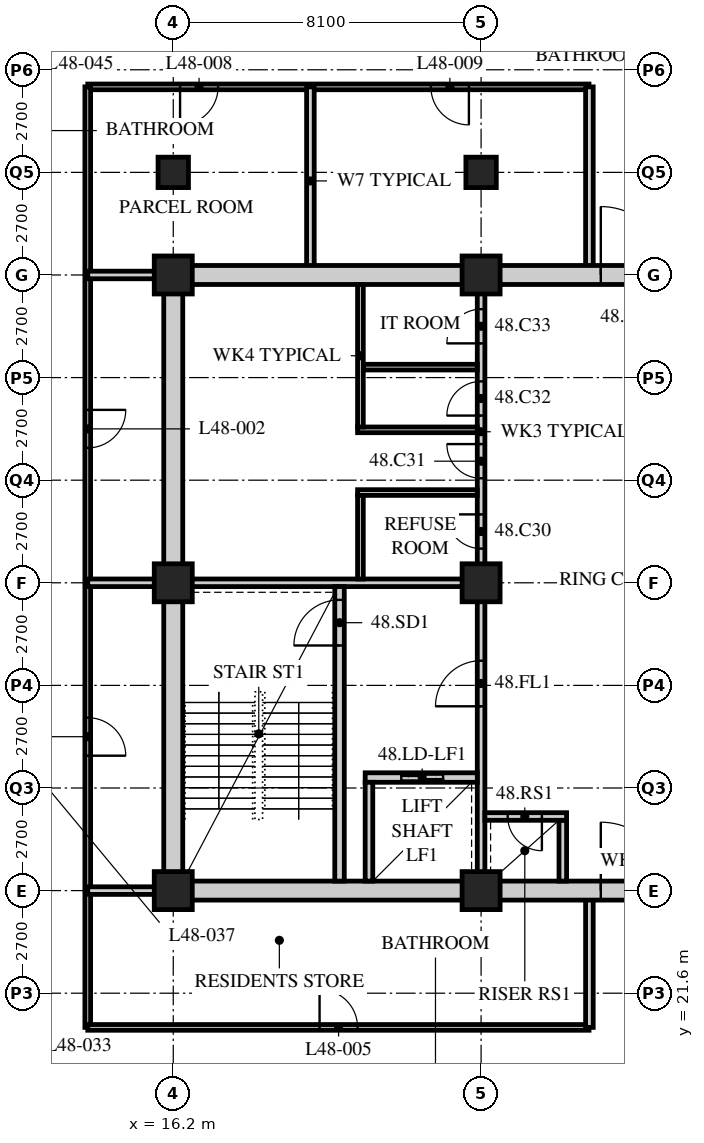
"""IFC4 building model, lengths in metres.
Left out: names, types, materials, properties, quantities, classifications, styles, units other than length and angle.
Written with IfcOpenShell. Run it as: python <this file> out.ifc"""

import sys

from ifc_helpers import new_model, si_unit, direction, frame, frame_2d, origin, origin_2d, place, context, subcontext, project, spatial, rectangle, hollow_rectangle, extrude, element, fill, save


model = new_model("IFC4")
c1 = context("Model", 3, precision=1e-05, world=origin(), true_north=direction((0.0, 1.0)))
c2 = subcontext(c1, "Body", "Model", "MODEL_VIEW")
j1 = project(units=[si_unit("LENGTHUNIT", "METRE"), si_unit("PLANEANGLEUNIT", "RADIAN")], contexts=[c1])
p1 = place(None, origin())
s1 = spatial("IfcSite", under=j1, at=p1, CompositionType="ELEMENT")
p2 = place(p1, origin())
s2 = spatial("IfcBuilding", under=s1, at=p2, CompositionType="ELEMENT")
p3 = place(p2, frame((0.0, 0.0, 188.4)))
s3 = spatial("IfcBuildingStorey", under=s2, at=p3, CompositionType="ELEMENT", Elevation=188.4)
for number, where, z_axis, x_axis in (
    (1, (16.2, 24.3, 0.0), (0.0, 0.0, 1.0), (1.0, 0.0, 0.0)),
    (2, (16.2, 32.4, 0.0), (0.0, 0.0, 1.0), (1.0, 0.0, 0.0)),
    (3, (16.2, 40.5, 0.0), (0.0, 0.0, 1.0), (1.0, 0.0, 0.0)),
):
    element("IfcColumn", number, at=place(p3, frame(where, z_axis=z_axis, x_axis=x_axis)), inside=s3, PredefinedType="COLUMN", context=c2, shape_type="SweptSolid", body=[
        extrude(hollow_rectangle(XDim=1.0, YDim=1.0, WallThickness=0.1, at=origin_2d()), origin(), (0.0, 0.0, 1.0), 3.6),
    ])
p4 = place(p3, frame((16.2, 43.2, 0.0), z_axis=(0.0, 0.0, 1.0), x_axis=(1.0, 0.0, 0.0)))
e4 = element("IfcColumn", 4, at=p4, inside=s3, PredefinedType="COLUMN", context=c2, shape_type="SweptSolid", body=[
    extrude(hollow_rectangle(XDim=0.8, YDim=0.8, WallThickness=0.08, at=origin_2d()), origin(), (0.0, 0.0, 1.0), 3.6),
])
for number, where, z_axis, x_axis in (
    (5, (24.3, 24.3, 0.0), (0.0, 0.0, 1.0), (1.0, 0.0, 0.0)),
    (6, (24.3, 32.4, 0.0), (0.0, 0.0, 1.0), (1.0, 0.0, 0.0)),
    (7, (24.3, 40.5, 0.0), (0.0, 0.0, 1.0), (1.0, 0.0, 0.0)),
):
    element("IfcColumn", number, at=place(p3, frame(where, z_axis=z_axis, x_axis=x_axis)), inside=s3, PredefinedType="COLUMN", context=c2, shape_type="SweptSolid", body=[
        extrude(hollow_rectangle(XDim=1.0, YDim=1.0, WallThickness=0.1, at=origin_2d()), origin(), (0.0, 0.0, 1.0), 3.6),
    ])
p5 = place(p3, frame((24.3, 43.2, 0.0), z_axis=(0.0, 0.0, 1.0), x_axis=(1.0, 0.0, 0.0)))
e8 = element("IfcColumn", 8, at=p5, inside=s3, PredefinedType="COLUMN", context=c2, shape_type="SweptSolid", body=[
    extrude(hollow_rectangle(XDim=0.8, YDim=0.8, WallThickness=0.08, at=origin_2d()), origin(), (0.0, 0.0, 1.0), 3.6),
])
p6 = place(p3, frame((27.14, 45.45, 0.0), z_axis=(0.0, 0.0, 1.0), x_axis=(-1.0, 0.0, 0.0)))
e9 = element("IfcWall", 9, at=p6, inside=s3, PredefinedType="PARTITIONING", context=c2, shape_type="SweptSolid", body=[
    extrude(rectangle(XDim=13.19, YDim=0.15, at=frame_2d((6.595, 0.0))), origin(), (0.0, 0.0, 1.0), 3.39),
])
p7 = place(p6, frame((9.761, 0.0, 0.0)))
e10 = element("IfcOpeningElement", 10, at=p7, cuts=e9, PredefinedType="OPENING", context=c2, shape_type="SweptSolid", body=[
    extrude(rectangle(XDim=1.0, YDim=2.1, at=frame_2d((0.5, 1.05))), frame((0.0, 0.085, 0.0), z_axis=(0.0, -1.0, 0.0), x_axis=(1.0, 0.0, 0.0)), (0.0, 0.0, 1.0), 0.17),
])
p8 = place(p6, frame((3.161, 0.0, 0.0)))
e11 = element("IfcOpeningElement", 11, at=p8, cuts=e9, PredefinedType="OPENING", context=c2, shape_type="SweptSolid", body=[
    extrude(rectangle(XDim=1.0, YDim=2.1, at=frame_2d((0.5, 1.05))), frame((0.0, 0.085, 0.0), z_axis=(0.0, -1.0, 0.0), x_axis=(1.0, 0.0, 0.0)), (0.0, 0.0, 1.0), 0.17),
])
p9 = place(p3, frame((13.95, 45.45, 0.0), z_axis=(0.0, 0.0, 1.0), x_axis=(0.0, -1.0, 0.0)))
e12 = element("IfcWall", 12, at=p9, inside=s3, PredefinedType="PARTITIONING", context=c2, shape_type="SweptSolid", body=[
    extrude(rectangle(XDim=24.75, YDim=0.15, at=frame_2d((12.375, 0.0))), origin(), (0.0, 0.0, 1.0), 3.39),
])
p10 = place(p9, frame((16.6, 0.0, 0.0)))
e13 = element("IfcOpeningElement", 13, at=p10, cuts=e12, PredefinedType="OPENING", context=c2, shape_type="SweptSolid", body=[
    extrude(rectangle(XDim=1.0, YDim=2.1, at=frame_2d((0.5, 1.05))), frame((0.0, 0.085, 0.0), z_axis=(0.0, -1.0, 0.0), x_axis=(1.0, 0.0, 0.0)), (0.0, 0.0, 1.0), 0.17),
])
p11 = place(p9, frame((8.5, 0.0, 0.0)))
e14 = element("IfcOpeningElement", 14, at=p11, cuts=e12, PredefinedType="OPENING", context=c2, shape_type="SweptSolid", body=[
    extrude(rectangle(XDim=1.0, YDim=2.1, at=frame_2d((0.5, 1.05))), frame((0.0, 0.085, 0.0), z_axis=(0.0, -1.0, 0.0), x_axis=(1.0, 0.0, 0.0)), (0.0, 0.0, 1.0), 0.17),
])
p12 = place(p3, frame((13.95, 20.7, 0.0), z_axis=(0.0, 0.0, 1.0), x_axis=(1.0, 0.0, 0.0)))
e15 = element("IfcWall", 15, at=p12, inside=s3, PredefinedType="PARTITIONING", context=c2, shape_type="SweptSolid", body=[
    extrude(rectangle(XDim=13.19, YDim=0.15, at=frame_2d((6.595, 0.0))), origin(), (0.0, 0.0, 1.0), 3.39),
])
p13 = place(p12, frame((6.1, 0.0, 0.0)))
e16 = element("IfcOpeningElement", 16, at=p13, cuts=e15, PredefinedType="OPENING", context=c2, shape_type="SweptSolid", body=[
    extrude(rectangle(XDim=1.0, YDim=2.1, at=frame_2d((0.5, 1.05))), frame((0.0, 0.085, 0.0), z_axis=(0.0, -1.0, 0.0), x_axis=(1.0, 0.0, 0.0)), (0.0, 0.0, 1.0), 0.17),
])
p14 = place(p3, frame((13.95, 32.4, 0.0), z_axis=(0.0, 0.0, 1.0), x_axis=(1.0, 0.0, 0.0)))
e17 = element("IfcWall", 17, at=p14, inside=s3, PredefinedType="SOLIDWALL", context=c2, shape_type="SweptSolid", body=[
    extrude(rectangle(XDim=2.25, YDim=0.2, at=frame_2d((1.125, 0.0))), origin(), (0.0, 0.0, 1.0), 3.39),
])
p15 = place(p3, frame((27.15, 20.7, 0.0), z_axis=(0.0, 0.0, 1.0), x_axis=(0.0, 1.0, 0.0)))
e18 = element("IfcWall", 18, at=p15, inside=s3, PredefinedType="SOLIDWALL", context=c2, shape_type="SweptSolid", body=[
    extrude(rectangle(XDim=3.6, YDim=0.2, at=frame_2d((1.8, 0.0))), origin(), (0.0, 0.0, 1.0), 3.39),
])
for number, where, z_axis, x_axis in (
    (19, (19.809, 45.45, 0.0), (0.0, 0.0, 1.0), (0.0, -1.0, 0.0)),
    (20, (27.15, 40.5, 0.0), (0.0, 0.0, 1.0), (0.0, 1.0, 0.0)),
):
    element("IfcWall", number, at=place(p3, frame(where, z_axis=z_axis, x_axis=x_axis)), inside=s3, PredefinedType="SOLIDWALL", context=c2, shape_type="SweptSolid", body=[
        extrude(rectangle(XDim=4.95, YDim=0.2, at=frame_2d((2.475, 0.0))), origin(), (0.0, 0.0, 1.0), 3.39),
    ])
for number, where, z_axis, x_axis in (
    (21, (13.95, 24.3, 0.0), (0.0, 0.0, 1.0), (1.0, 0.0, 0.0)),
    (22, (13.95, 40.5, 0.0), (0.0, 0.0, 1.0), (1.0, 0.0, 0.0)),
):
    element("IfcWall", number, at=place(p3, frame(where, z_axis=z_axis, x_axis=x_axis)), inside=s3, PredefinedType="SOLIDWALL", context=c2, shape_type="SweptSolid", body=[
        extrude(rectangle(XDim=2.25, YDim=0.2, at=frame_2d((1.125, 0.0))), origin(), (0.0, 0.0, 1.0), 3.39),
    ])
p16 = place(p3, frame((15.95, 24.3, 0.0), z_axis=(0.0, 0.0, 1.0), x_axis=(1.0, 0.0, 0.0)))
e23 = element("IfcWall", 23, at=p16, inside=s3, PredefinedType="SOLIDWALL", context=c2, shape_type="SweptSolid", body=[
    extrude(rectangle(XDim=24.8, YDim=0.5, at=frame_2d((12.4, 0.0))), origin(), (0.0, 0.0, 1.0), 2.74),
])
p17 = place(p16, frame((11.5, 0.0, 0.0)))
e24 = element("IfcOpeningElement", 24, at=p17, cuts=e23, PredefinedType="OPENING", context=c2, shape_type="SweptSolid", body=[
    extrude(rectangle(XDim=1.8, YDim=2.4, at=frame_2d((0.9, 1.2))), frame((0.0, 0.26, 0.0), z_axis=(0.0, -1.0, 0.0), x_axis=(1.0, 0.0, 0.0)), (0.0, 0.0, 1.0), 0.52),
])
p18 = place(p3, frame((15.95, 40.5, 0.0), z_axis=(0.0, 0.0, 1.0), x_axis=(1.0, 0.0, 0.0)))
e25 = element("IfcWall", 25, at=p18, inside=s3, PredefinedType="SOLIDWALL", context=c2, shape_type="SweptSolid", body=[
    extrude(rectangle(XDim=24.8, YDim=0.5, at=frame_2d((12.4, 0.0))), origin(), (0.0, 0.0, 1.0), 2.74),
])
p19 = place(p18, frame((11.5, 0.0, 0.0)))
e26 = element("IfcOpeningElement", 26, at=p19, cuts=e25, PredefinedType="OPENING", context=c2, shape_type="SweptSolid", body=[
    extrude(rectangle(XDim=1.8, YDim=2.4, at=frame_2d((0.9, 1.2))), frame((0.0, 0.26, 0.0), z_axis=(0.0, -1.0, 0.0), x_axis=(1.0, 0.0, 0.0)), (0.0, 0.0, 1.0), 0.52),
])
p20 = place(p3, frame((16.2, 24.55, 0.0), z_axis=(0.0, 0.0, 1.0), x_axis=(0.0, 1.0, 0.0)))
e27 = element("IfcWall", 27, at=p20, inside=s3, PredefinedType="SOLIDWALL", context=c2, shape_type="SweptSolid", body=[
    extrude(rectangle(XDim=15.7, YDim=0.5, at=frame_2d((7.85, 0.0))), origin(), (0.0, 0.0, 1.0), 2.778),
])
p21 = place(p3, frame((16.45, 32.4, 0.0), z_axis=(0.0, 0.0, 1.0), x_axis=(1.0, 0.0, 0.0)))
e28 = element("IfcWall", 28, at=p21, inside=s3, PredefinedType="SOLIDWALL", context=c2, shape_type="SweptSolid", body=[
    extrude(rectangle(XDim=7.95, YDim=0.2, at=frame_2d((3.975, 0.0))), origin(), (0.0, 0.0, 1.0), 2.778),
])
p22 = place(p3, frame((24.3, 24.55, 0.0), z_axis=(0.0, 0.0, 1.0), x_axis=(0.0, 1.0, 0.0)))
e29 = element("IfcWall", 29, at=p22, inside=s3, PredefinedType="SOLIDWALL", context=c2, shape_type="SweptSolid", body=[
    extrude(rectangle(XDim=7.75, YDim=0.2, at=frame_2d((3.875, 0.0))), origin(), (0.0, 0.0, 1.0), 2.778),
])
p23 = place(p22, frame((4.6, 0.0, 0.0)))
e30 = element("IfcOpeningElement", 30, at=p23, cuts=e29, PredefinedType="OPENING", context=c2, shape_type="SweptSolid", body=[
    extrude(rectangle(XDim=1.2, YDim=2.1, at=frame_2d((0.6, 1.05))), frame((0.0, 0.11, 0.0), z_axis=(0.0, -1.0, 0.0), x_axis=(1.0, 0.0, 0.0)), (0.0, 0.0, 1.0), 0.22),
])
p24 = place(p3, frame((20.575, 24.55, 0.0), z_axis=(0.0, 0.0, 1.0), x_axis=(0.0, 1.0, 0.0)))
e31 = element("IfcWall", 31, at=p24, inside=s3, PredefinedType="SOLIDWALL", context=c2, shape_type="SweptSolid", body=[
    extrude(rectangle(XDim=7.75, YDim=0.25, at=frame_2d((3.875, 0.0))), origin(), (0.0, 0.0, 1.0), 3.39),
])
p25 = place(p24, frame((6.2, 0.0, 0.0)))
e32 = element("IfcOpeningElement", 32, at=p25, cuts=e31, PredefinedType="OPENING", context=c2, shape_type="SweptSolid", body=[
    extrude(rectangle(XDim=1.2, YDim=2.1, at=frame_2d((0.6, 1.05))), frame((0.0, 0.135, 0.0), z_axis=(0.0, -1.0, 0.0), x_axis=(1.0, 0.0, 0.0)), (0.0, 0.0, 1.0), 0.27),
])
p26 = place(p3, frame((21.25, 27.275, 0.0), z_axis=(0.0, 0.0, 1.0), x_axis=(1.0, 0.0, 0.0)))
e33 = element("IfcWall", 33, at=p26, inside=s3, PredefinedType="SOLIDWALL", context=c2, shape_type="SweptSolid", body=[
    extrude(rectangle(XDim=2.95, YDim=0.25, at=frame_2d((1.475, 0.0))), origin(), (0.0, 0.0, 1.0), 3.39),
])
p27 = place(p26, frame((0.95, 0.0, 0.0)))
e34 = element("IfcOpeningElement", 34, at=p27, cuts=e33, PredefinedType="OPENING", context=c2, shape_type="SweptSolid", body=[
    extrude(rectangle(XDim=1.1, YDim=2.4, at=frame_2d((0.55, 1.2))), frame((0.0, 0.135, 0.0), z_axis=(0.0, -1.0, 0.0), x_axis=(1.0, 0.0, 0.0)), (0.0, 0.0, 1.0), 0.27),
])
p28 = place(p3, frame((21.35, 24.55, 0.0), z_axis=(0.0, 0.0, 1.0), x_axis=(0.0, 1.0, 0.0)))
e35 = element("IfcWall", 35, at=p28, inside=s3, PredefinedType="SOLIDWALL", context=c2, shape_type="SweptSolid", body=[
    extrude(rectangle(XDim=2.6, YDim=0.2, at=frame_2d((1.3, 0.0))), origin(), (0.0, 0.0, 1.0), 3.39),
])
p29 = place(p3, frame((26.45, 24.55, 0.0), z_axis=(0.0, 0.0, 1.0), x_axis=(0.0, 1.0, 0.0)))
e36 = element("IfcWall", 36, at=p29, inside=s3, PredefinedType="SOLIDWALL", context=c2, shape_type="SweptSolid", body=[
    extrude(rectangle(XDim=1.6, YDim=0.2, at=frame_2d((0.8, 0.0))), origin(), (0.0, 0.0, 1.0), 3.39),
])
p30 = place(p3, frame((24.4, 26.25, 0.0), z_axis=(0.0, 0.0, 1.0), x_axis=(1.0, 0.0, 0.0)))
e37 = element("IfcWall", 37, at=p30, inside=s3, PredefinedType="SOLIDWALL", context=c2, shape_type="SweptSolid", body=[
    extrude(rectangle(XDim=2.15, YDim=0.2, at=frame_2d((1.075, 0.0))), origin(), (0.0, 0.0, 1.0), 3.39),
])
p31 = place(p30, frame((0.6, 0.0, 0.0)))
e38 = element("IfcOpeningElement", 38, at=p31, cuts=e37, PredefinedType="OPENING", context=c2, shape_type="SweptSolid", body=[
    extrude(rectangle(XDim=0.9, YDim=2.1, at=frame_2d((0.45, 1.05))), frame((0.0, 0.11, 0.0), z_axis=(0.0, -1.0, 0.0), x_axis=(1.0, 0.0, 0.0)), (0.0, 0.0, 1.0), 0.22),
])
p32 = place(p3, frame((24.3, 32.5, 0.0), z_axis=(0.0, 0.0, 1.0), x_axis=(0.0, 1.0, 0.0)))
e39 = element("IfcWall", 39, at=p32, inside=s3, PredefinedType="PARTITIONING", context=c2, shape_type="SweptSolid", body=[
    extrude(rectangle(XDim=7.75, YDim=0.2, at=frame_2d((3.875, 0.0))), origin(), (0.0, 0.0, 1.0), 2.778),
])
p33 = place(p32, frame((0.8, 0.0, 0.0)))
e40 = element("IfcOpeningElement", 40, at=p33, cuts=e39, PredefinedType="OPENING", context=c2, shape_type="SweptSolid", body=[
    extrude(rectangle(XDim=0.9, YDim=2.1, at=frame_2d((0.45, 1.05))), frame((0.0, 0.11, 0.0), z_axis=(0.0, -1.0, 0.0), x_axis=(1.0, 0.0, 0.0)), (0.0, 0.0, 1.0), 0.22),
])
p34 = place(p32, frame((2.65, 0.0, 0.0)))
e41 = element("IfcOpeningElement", 41, at=p34, cuts=e39, PredefinedType="OPENING", context=c2, shape_type="SweptSolid", body=[
    extrude(rectangle(XDim=0.9, YDim=2.1, at=frame_2d((0.45, 1.05))), frame((0.0, 0.11, 0.0), z_axis=(0.0, -1.0, 0.0), x_axis=(1.0, 0.0, 0.0)), (0.0, 0.0, 1.0), 0.22),
])
p35 = place(p32, frame((4.3, 0.0, 0.0)))
e42 = element("IfcOpeningElement", 42, at=p35, cuts=e39, PredefinedType="OPENING", context=c2, shape_type="SweptSolid", body=[
    extrude(rectangle(XDim=0.9, YDim=2.1, at=frame_2d((0.45, 1.05))), frame((0.0, 0.11, 0.0), z_axis=(0.0, -1.0, 0.0), x_axis=(1.0, 0.0, 0.0)), (0.0, 0.0, 1.0), 0.22),
])
p36 = place(p32, frame((6.2, 0.0, 0.0)))
e43 = element("IfcOpeningElement", 43, at=p36, cuts=e39, PredefinedType="OPENING", context=c2, shape_type="SweptSolid", body=[
    extrude(rectangle(XDim=0.9, YDim=2.1, at=frame_2d((0.45, 1.05))), frame((0.0, 0.11, 0.0), z_axis=(0.0, -1.0, 0.0), x_axis=(1.0, 0.0, 0.0)), (0.0, 0.0, 1.0), 0.22),
])
for number, where, z_axis, x_axis in (
    (44, (21.05, 34.775, 0.0), (0.0, 0.0, 1.0), (1.0, 0.0, 0.0)),
    (45, (21.05, 36.425, 0.0), (0.0, 0.0, 1.0), (1.0, 0.0, 0.0)),
):
    element("IfcWall", number, at=place(p3, frame(where, z_axis=z_axis, x_axis=x_axis)), inside=s3, PredefinedType="PARTITIONING", context=c2, shape_type="SweptSolid", body=[
        extrude(rectangle(XDim=3.15, YDim=0.15, at=frame_2d((1.575, 0.0))), origin(), (0.0, 0.0, 1.0), 3.39),
    ])
p37 = place(p3, frame((21.2, 38.075, 0.0), z_axis=(0.0, 0.0, 1.0), x_axis=(1.0, 0.0, 0.0)))
e46 = element("IfcWall", 46, at=p37, inside=s3, PredefinedType="PARTITIONING", context=c2, shape_type="SweptSolid", body=[
    extrude(rectangle(XDim=3.0, YDim=0.15, at=frame_2d((1.5, 0.0))), origin(), (0.0, 0.0, 1.0), 3.39),
])
p38 = place(p3, frame((21.125, 32.5, 0.0), z_axis=(0.0, 0.0, 1.0), x_axis=(0.0, 1.0, 0.0)))
e47 = element("IfcWall", 47, at=p38, inside=s3, PredefinedType="PARTITIONING", context=c2, shape_type="SweptSolid", body=[
    extrude(rectangle(XDim=2.2, YDim=0.15, at=frame_2d((1.1, 0.0))), origin(), (0.0, 0.0, 1.0), 3.39),
])
p39 = place(p3, frame((21.125, 36.5, 0.0), z_axis=(0.0, 0.0, 1.0), x_axis=(0.0, 1.0, 0.0)))
e48 = element("IfcWall", 48, at=p39, inside=s3, PredefinedType="PARTITIONING", context=c2, shape_type="SweptSolid", body=[
    extrude(rectangle(XDim=3.75, YDim=0.15, at=frame_2d((1.875, 0.0))), origin(), (0.0, 0.0, 1.0), 3.39),
])
p40 = place(p10, origin())
e49 = element("IfcDoor", 49, at=p40, inside=s3, OperationType="SINGLE_SWING_RIGHT", PredefinedType="DOOR", context=c2, shape_type="SweptSolid", body=[
    extrude(rectangle(XDim=1.0, YDim=2.1, at=frame_2d((0.5, 1.05))), frame((0.0, 0.025, 0.0), z_axis=(0.0, -1.0, 0.0), x_axis=(1.0, 0.0, 0.0)), (0.0, 0.0, 1.0), 0.05),
])
fill(e13, e49)
p41 = place(p11, origin())
e50 = element("IfcDoor", 50, at=p41, inside=s3, OperationType="SINGLE_SWING_LEFT", PredefinedType="DOOR", context=c2, shape_type="SweptSolid", body=[
    extrude(rectangle(XDim=1.0, YDim=2.1, at=frame_2d((0.5, 1.05))), frame((0.0, 0.025, 0.0), z_axis=(0.0, -1.0, 0.0), x_axis=(1.0, 0.0, 0.0)), (0.0, 0.0, 1.0), 0.05),
])
fill(e14, e50)
p42 = place(p13, origin())
e51 = element("IfcDoor", 51, at=p42, inside=s3, OperationType="SINGLE_SWING_LEFT", PredefinedType="DOOR", context=c2, shape_type="SweptSolid", body=[
    extrude(rectangle(XDim=1.0, YDim=2.1, at=frame_2d((0.5, 1.05))), frame((0.0, 0.025, 0.0), z_axis=(0.0, -1.0, 0.0), x_axis=(1.0, 0.0, 0.0)), (0.0, 0.0, 1.0), 0.05),
])
fill(e16, e51)
p43 = place(p7, origin())
e52 = element("IfcDoor", 52, at=p43, inside=s3, OperationType="SINGLE_SWING_RIGHT", PredefinedType="DOOR", context=c2, shape_type="SweptSolid", body=[
    extrude(rectangle(XDim=1.0, YDim=2.1, at=frame_2d((0.5, 1.05))), frame((0.0, 0.025, 0.0), z_axis=(0.0, -1.0, 0.0), x_axis=(1.0, 0.0, 0.0)), (0.0, 0.0, 1.0), 0.05),
])
fill(e10, e52)
p44 = place(p8, origin())
e53 = element("IfcDoor", 53, at=p44, inside=s3, OperationType="SINGLE_SWING_LEFT", PredefinedType="DOOR", context=c2, shape_type="SweptSolid", body=[
    extrude(rectangle(XDim=1.0, YDim=2.1, at=frame_2d((0.5, 1.05))), frame((0.0, 0.025, 0.0), z_axis=(0.0, -1.0, 0.0), x_axis=(1.0, 0.0, 0.0)), (0.0, 0.0, 1.0), 0.05),
])
fill(e11, e53)
p45 = place(p33, origin())
e54 = element("IfcDoor", 54, at=p45, inside=s3, OperationType="SINGLE_SWING_RIGHT", PredefinedType="DOOR", context=c2, shape_type="SweptSolid", body=[
    extrude(rectangle(XDim=0.9, YDim=2.1, at=frame_2d((0.45, 1.05))), frame((0.0, 0.025, 0.0), z_axis=(0.0, -1.0, 0.0), x_axis=(1.0, 0.0, 0.0)), (0.0, 0.0, 1.0), 0.05),
])
fill(e40, e54)
p46 = place(p34, origin())
e55 = element("IfcDoor", 55, at=p46, inside=s3, OperationType="SINGLE_SWING_RIGHT", PredefinedType="DOOR", context=c2, shape_type="SweptSolid", body=[
    extrude(rectangle(XDim=0.9, YDim=2.1, at=frame_2d((0.45, 1.05))), frame((0.0, 0.025, 0.0), z_axis=(0.0, -1.0, 0.0), x_axis=(1.0, 0.0, 0.0)), (0.0, 0.0, 1.0), 0.05),
])
fill(e41, e55)
p47 = place(p35, origin())
e56 = element("IfcDoor", 56, at=p47, inside=s3, OperationType="SINGLE_SWING_LEFT", PredefinedType="DOOR", context=c2, shape_type="SweptSolid", body=[
    extrude(rectangle(XDim=0.9, YDim=2.1, at=frame_2d((0.45, 1.05))), frame((0.0, 0.025, 0.0), z_axis=(0.0, -1.0, 0.0), x_axis=(1.0, 0.0, 0.0)), (0.0, 0.0, 1.0), 0.05),
])
fill(e42, e56)
p48 = place(p36, origin())
e57 = element("IfcDoor", 57, at=p48, inside=s3, OperationType="SINGLE_SWING_LEFT", PredefinedType="DOOR", context=c2, shape_type="SweptSolid", body=[
    extrude(rectangle(XDim=0.9, YDim=2.1, at=frame_2d((0.45, 1.05))), frame((0.0, 0.025, 0.0), z_axis=(0.0, -1.0, 0.0), x_axis=(1.0, 0.0, 0.0)), (0.0, 0.0, 1.0), 0.05),
])
fill(e43, e57)
p49 = place(p25, origin())
e58 = element("IfcDoor", 58, at=p49, inside=s3, OperationType="SINGLE_SWING_LEFT", PredefinedType="DOOR", context=c2, shape_type="SweptSolid", body=[
    extrude(rectangle(XDim=1.2, YDim=2.1, at=frame_2d((0.6, 1.05))), frame((0.0, 0.025, 0.0), z_axis=(0.0, -1.0, 0.0), x_axis=(1.0, 0.0, 0.0)), (0.0, 0.0, 1.0), 0.05),
])
fill(e32, e58)
p50 = place(p23, origin())
e59 = element("IfcDoor", 59, at=p50, inside=s3, OperationType="SINGLE_SWING_LEFT", PredefinedType="DOOR", context=c2, shape_type="SweptSolid", body=[
    extrude(rectangle(XDim=1.2, YDim=2.1, at=frame_2d((0.6, 1.05))), frame((0.0, 0.025, 0.0), z_axis=(0.0, -1.0, 0.0), x_axis=(1.0, 0.0, 0.0)), (0.0, 0.0, 1.0), 0.05),
])
fill(e30, e59)
p51 = place(p31, origin())
e60 = element("IfcDoor", 60, at=p51, inside=s3, OperationType="SINGLE_SWING_LEFT", PredefinedType="DOOR", context=c2, shape_type="SweptSolid", body=[
    extrude(rectangle(XDim=0.9, YDim=2.1, at=frame_2d((0.45, 1.05))), frame((0.0, 0.025, 0.0), z_axis=(0.0, -1.0, 0.0), x_axis=(1.0, 0.0, 0.0)), (0.0, 0.0, 1.0), 0.05),
])
fill(e38, e60)
p52 = place(p27, origin())
e61 = element("IfcDoor", 61, at=p52, inside=s3, OperationType="DOUBLE_DOOR_SLIDING", PredefinedType="DOOR", context=c2, shape_type="SweptSolid", body=[
    extrude(rectangle(XDim=1.1, YDim=2.4, at=frame_2d((0.55, 1.2))), frame((0.0, 0.025, 0.0), z_axis=(0.0, -1.0, 0.0), x_axis=(1.0, 0.0, 0.0)), (0.0, 0.0, 1.0), 0.05),
])
fill(e34, e61)
p53 = place(p17, origin())
e62 = element("IfcDoor", 62, at=p53, inside=s3, OperationType="DOUBLE_DOOR_SINGLE_SWING", PredefinedType="DOOR", context=c2, shape_type="SweptSolid", body=[
    extrude(rectangle(XDim=1.8, YDim=2.4, at=frame_2d((0.9, 1.2))), frame((0.0, 0.025, 0.0), z_axis=(0.0, -1.0, 0.0), x_axis=(1.0, 0.0, 0.0)), (0.0, 0.0, 1.0), 0.05),
])
fill(e24, e62)
p54 = place(p19, origin())
e63 = element("IfcDoor", 63, at=p54, inside=s3, OperationType="DOUBLE_DOOR_SINGLE_SWING", PredefinedType="DOOR", context=c2, shape_type="SweptSolid", body=[
    extrude(rectangle(XDim=1.8, YDim=2.4, at=frame_2d((0.9, 1.2))), frame((0.0, 0.025, 0.0), z_axis=(0.0, -1.0, 0.0), x_axis=(1.0, 0.0, 0.0)), (0.0, 0.0, 1.0), 0.05),
])
fill(e26, e63)
save(model, sys.argv[1])
